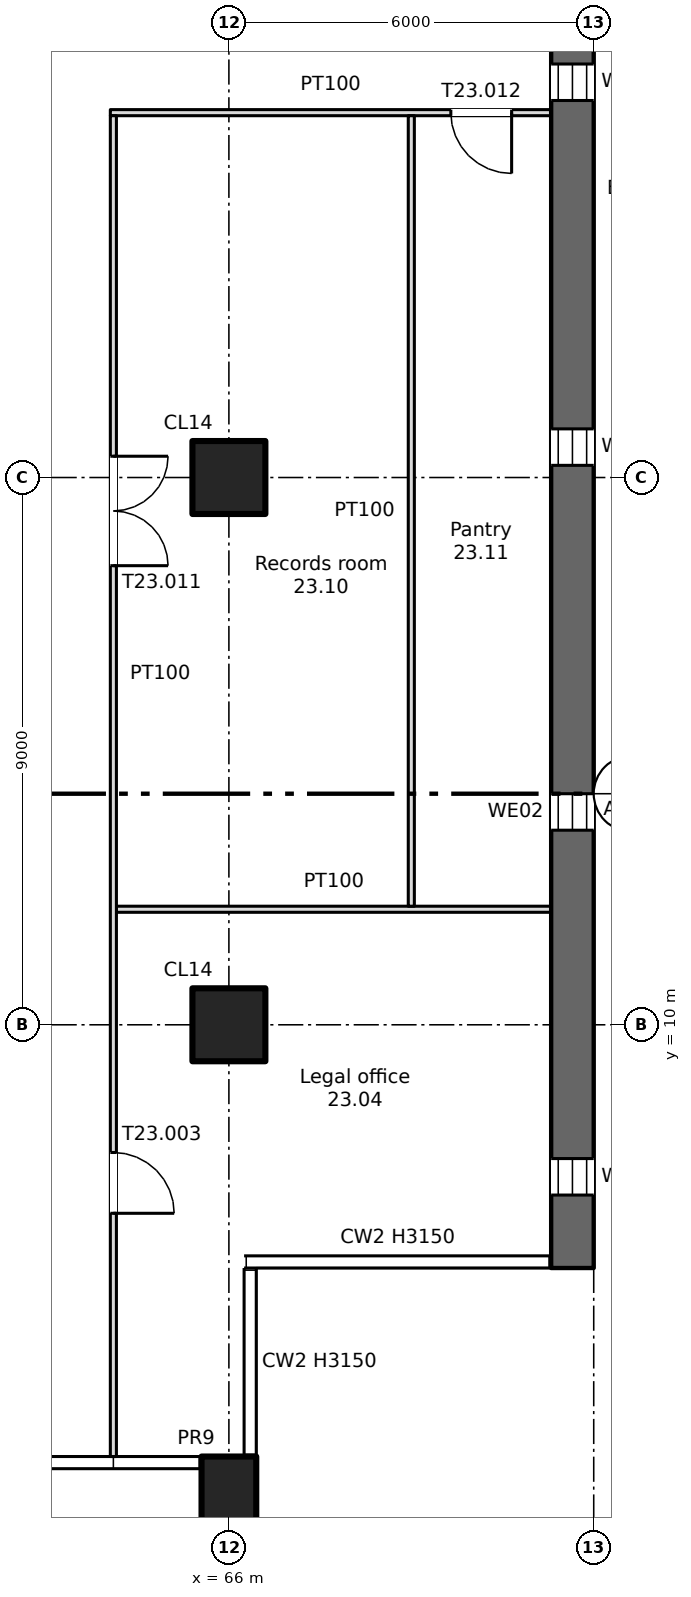
"""IFC4 building model, lengths in metres.
Left out: names, types, materials, properties, quantities, classifications, styles, units other than length and angle.
Written with IfcOpenShell. Run it as: python <this file> out.ifc"""

import sys

from ifc_helpers import new_model, si_unit, direction, frame, frame_2d, origin, origin_2d, place, context, subcontext, project, spatial, rectangle, extrude, element, fill, save


model = new_model("IFC4")
c1 = context("Model", 3, precision=1e-05, world=origin(), true_north=direction((0.0, 1.0)))
c2 = subcontext(c1, "Body", "Model", "MODEL_VIEW")
j1 = project(units=[si_unit("LENGTHUNIT", "METRE"), si_unit("PLANEANGLEUNIT", "RADIAN")], contexts=[c1])
p1 = place(None, origin())
s1 = spatial("IfcSite", under=j1, at=p1, CompositionType="ELEMENT")
p2 = place(p1, origin())
s2 = spatial("IfcBuilding", under=s1, at=p2, CompositionType="ELEMENT")
p3 = place(p2, frame((0.0, 0.0, 155.0)))
s3 = spatial("IfcBuildingStorey", under=s2, at=p3, CompositionType="ELEMENT", Elevation=155.0)
p4 = place(p3, frame((66.0, 2.2, -0.4), z_axis=(0.0, 0.0, 1.0), x_axis=(1.0, 0.0, 0.0)))
e1 = element("IfcColumn", 1, at=p4, inside=s3, PredefinedType="COLUMN", context=c2, shape_type="SweptSolid", body=[
    extrude(rectangle(XDim=0.9, YDim=1.4, at=origin_2d()), origin(), (0.0, 0.0, 1.0), 3.55),
])
for number, where, z_axis, x_axis in (
    (2, (66.0, 10.0, 0.0), (0.0, 0.0, 1.0), (1.0, 0.0, 0.0)),
    (3, (66.0, 19.0, 0.0), (0.0, 0.0, 1.0), (1.0, 0.0, 0.0)),
):
    element("IfcColumn", number, at=place(p3, frame(where, z_axis=z_axis, x_axis=x_axis)), inside=s3, PredefinedType="COLUMN", context=c2, shape_type="SweptSolid", body=[
        extrude(rectangle(XDim=1.2, YDim=1.2, at=origin_2d()), origin(), (0.0, 0.0, 1.0), 3.15),
    ])
p5 = place(p3, frame((71.65, 6.0, 0.0), z_axis=(0.0, 0.0, 1.0), x_axis=(0.0, 1.0, 0.0)))
e4 = element("IfcWall", 4, at=p5, inside=s3, PredefinedType="SHEAR", context=c2, shape_type="SweptSolid", body=[
    extrude(rectangle(XDim=35.5, YDim=0.7, at=frame_2d((17.75, 0.0))), origin(), (0.0, 0.0, 1.0), 3.15),
])
p6 = place(p5, frame((1.2, 0.0, 0.6)))
e5 = element("IfcOpeningElement", 5, at=p6, cuts=e4, PredefinedType="OPENING", context=c2, shape_type="SweptSolid", body=[
    extrude(rectangle(XDim=0.6, YDim=2.4, at=frame_2d((0.3, 1.2))), frame((0.0, 0.36, 0.0), z_axis=(0.0, -1.0, 0.0), x_axis=(1.0, 0.0, 0.0)), (0.0, 0.0, 1.0), 0.72),
])
p7 = place(p5, frame((7.2, 0.0, 0.6)))
e6 = element("IfcOpeningElement", 6, at=p7, cuts=e4, PredefinedType="OPENING", context=c2, shape_type="SweptSolid", body=[
    extrude(rectangle(XDim=0.6, YDim=2.4, at=frame_2d((0.3, 1.2))), frame((0.0, 0.36, 0.0), z_axis=(0.0, -1.0, 0.0), x_axis=(1.0, 0.0, 0.0)), (0.0, 0.0, 1.0), 0.72),
])
p8 = place(p5, frame((13.2, 0.0, 0.6)))
e7 = element("IfcOpeningElement", 7, at=p8, cuts=e4, PredefinedType="OPENING", context=c2, shape_type="SweptSolid", body=[
    extrude(rectangle(XDim=0.6, YDim=2.4, at=frame_2d((0.3, 1.2))), frame((0.0, 0.36, 0.0), z_axis=(0.0, -1.0, 0.0), x_axis=(1.0, 0.0, 0.0)), (0.0, 0.0, 1.0), 0.72),
])
p9 = place(p5, frame((19.2, 0.0, 0.6)))
e8 = element("IfcOpeningElement", 8, at=p9, cuts=e4, PredefinedType="OPENING", context=c2, shape_type="SweptSolid", body=[
    extrude(rectangle(XDim=0.6, YDim=2.4, at=frame_2d((0.3, 1.2))), frame((0.0, 0.36, 0.0), z_axis=(0.0, -1.0, 0.0), x_axis=(1.0, 0.0, 0.0)), (0.0, 0.0, 1.0), 0.72),
])
p10 = place(p5, frame((25.2, 0.0, 0.6)))
e9 = element("IfcOpeningElement", 9, at=p10, cuts=e4, PredefinedType="OPENING", context=c2, shape_type="SweptSolid", body=[
    extrude(rectangle(XDim=0.6, YDim=2.4, at=frame_2d((0.3, 1.2))), frame((0.0, 0.36, 0.0), z_axis=(0.0, -1.0, 0.0), x_axis=(1.0, 0.0, 0.0)), (0.0, 0.0, 1.0), 0.72),
])
p11 = place(p5, frame((31.2, 0.0, 0.6)))
e10 = element("IfcOpeningElement", 10, at=p11, cuts=e4, PredefinedType="OPENING", context=c2, shape_type="SweptSolid", body=[
    extrude(rectangle(XDim=0.6, YDim=2.4, at=frame_2d((0.3, 1.2))), frame((0.0, 0.36, 0.0), z_axis=(0.0, -1.0, 0.0), x_axis=(1.0, 0.0, 0.0)), (0.0, 0.0, 1.0), 0.72),
])
p12 = place(p3, frame((64.15, 11.9, 0.0), z_axis=(0.0, 0.0, 1.0), x_axis=(1.0, 0.0, 0.0)))
e11 = element("IfcWall", 11, at=p12, inside=s3, PredefinedType="PARTITIONING", context=c2, shape_type="SweptSolid", body=[
    extrude(rectangle(XDim=7.15, YDim=0.1, at=frame_2d((3.575, 0.0))), origin(), (0.0, 0.0, 1.0), 3.15),
])
p13 = place(p3, frame((64.05, 25.0, 0.0), z_axis=(0.0, 0.0, 1.0), x_axis=(1.0, 0.0, 0.0)))
e12 = element("IfcWall", 12, at=p13, inside=s3, PredefinedType="PARTITIONING", context=c2, shape_type="SweptSolid", body=[
    extrude(rectangle(XDim=7.25, YDim=0.1, at=frame_2d((3.625, 0.0))), origin(), (0.0, 0.0, 1.0), 3.15),
])
p14 = place(p13, frame((5.6, 0.0, 0.0)))
e13 = element("IfcOpeningElement", 13, at=p14, cuts=e12, PredefinedType="OPENING", context=c2, shape_type="SweptSolid", body=[
    extrude(rectangle(XDim=1.0, YDim=2.1, at=frame_2d((0.5, 1.05))), frame((0.0, 0.06, 0.0), z_axis=(0.0, -1.0, 0.0), x_axis=(1.0, 0.0, 0.0)), (0.0, 0.0, 1.0), 0.12),
])
p15 = place(p3, frame((64.1, 2.9, 0.0), z_axis=(0.0, 0.0, 1.0), x_axis=(0.0, 1.0, 0.0)))
e14 = element("IfcWall", 14, at=p15, inside=s3, PredefinedType="PARTITIONING", context=c2, shape_type="SweptSolid", body=[
    extrude(rectangle(XDim=22.05, YDim=0.1, at=frame_2d((11.025, 0.0))), origin(), (0.0, 0.0, 1.0), 3.15),
])
p16 = place(p15, frame((4.0, 0.0, 0.0)))
e15 = element("IfcOpeningElement", 15, at=p16, cuts=e14, PredefinedType="OPENING", context=c2, shape_type="SweptSolid", body=[
    extrude(rectangle(XDim=1.0, YDim=2.1, at=frame_2d((0.5, 1.05))), frame((0.0, 0.06, 0.0), z_axis=(0.0, -1.0, 0.0), x_axis=(1.0, 0.0, 0.0)), (0.0, 0.0, 1.0), 0.12),
])
p17 = place(p15, frame((14.65, 0.0, 0.0)))
e16 = element("IfcOpeningElement", 16, at=p17, cuts=e14, PredefinedType="OPENING", context=c2, shape_type="SweptSolid", body=[
    extrude(rectangle(XDim=1.8, YDim=2.1, at=frame_2d((0.9, 1.05))), frame((0.0, 0.06, 0.0), z_axis=(0.0, -1.0, 0.0), x_axis=(1.0, 0.0, 0.0)), (0.0, 0.0, 1.0), 0.12),
])
p18 = place(p3, frame((69.0, 11.95, 0.0), z_axis=(0.0, 0.0, 1.0), x_axis=(0.0, 1.0, 0.0)))
e17 = element("IfcWall", 17, at=p18, inside=s3, PredefinedType="PARTITIONING", context=c2, shape_type="SweptSolid", body=[
    extrude(rectangle(XDim=13.0, YDim=0.1, at=frame_2d((6.5, 0.0))), origin(), (0.0, 0.0, 1.0), 3.15),
])
p19 = place(p6, origin())
e18 = element("IfcWindow", 18, at=p19, inside=s3, PartitioningType="SINGLE_PANEL", PredefinedType="WINDOW", context=c2, shape_type="SweptSolid", body=[
    extrude(rectangle(XDim=0.6, YDim=2.4, at=frame_2d((0.3, 1.2))), frame((0.0, 0.03, 0.0), z_axis=(0.0, -1.0, 0.0), x_axis=(1.0, 0.0, 0.0)), (0.0, 0.0, 1.0), 0.06),
])
fill(e5, e18)
p20 = place(p7, origin())
e19 = element("IfcWindow", 19, at=p20, inside=s3, PartitioningType="SINGLE_PANEL", PredefinedType="WINDOW", context=c2, shape_type="SweptSolid", body=[
    extrude(rectangle(XDim=0.6, YDim=2.4, at=frame_2d((0.3, 1.2))), frame((0.0, 0.03, 0.0), z_axis=(0.0, -1.0, 0.0), x_axis=(1.0, 0.0, 0.0)), (0.0, 0.0, 1.0), 0.06),
])
fill(e6, e19)
p21 = place(p8, origin())
e20 = element("IfcWindow", 20, at=p21, inside=s3, PartitioningType="SINGLE_PANEL", PredefinedType="WINDOW", context=c2, shape_type="SweptSolid", body=[
    extrude(rectangle(XDim=0.6, YDim=2.4, at=frame_2d((0.3, 1.2))), frame((0.0, 0.03, 0.0), z_axis=(0.0, -1.0, 0.0), x_axis=(1.0, 0.0, 0.0)), (0.0, 0.0, 1.0), 0.06),
])
fill(e7, e20)
p22 = place(p9, origin())
e21 = element("IfcWindow", 21, at=p22, inside=s3, PartitioningType="SINGLE_PANEL", PredefinedType="WINDOW", context=c2, shape_type="SweptSolid", body=[
    extrude(rectangle(XDim=0.6, YDim=2.4, at=frame_2d((0.3, 1.2))), frame((0.0, 0.03, 0.0), z_axis=(0.0, -1.0, 0.0), x_axis=(1.0, 0.0, 0.0)), (0.0, 0.0, 1.0), 0.06),
])
fill(e8, e21)
p23 = place(p16, origin())
e22 = element("IfcDoor", 22, at=p23, inside=s3, OperationType="SINGLE_SWING_LEFT", PredefinedType="DOOR", context=c2, shape_type="SweptSolid", body=[
    extrude(rectangle(XDim=1.0, YDim=2.1, at=frame_2d((0.5, 1.05))), frame((0.0, 0.025, 0.0), z_axis=(0.0, -1.0, 0.0), x_axis=(1.0, 0.0, 0.0)), (0.0, 0.0, 1.0), 0.05),
])
fill(e15, e22)
p24 = place(p17, origin())
e23 = element("IfcDoor", 23, at=p24, inside=s3, OperationType="DOUBLE_DOOR_SINGLE_SWING", PredefinedType="DOOR", context=c2, shape_type="SweptSolid", body=[
    extrude(rectangle(XDim=1.8, YDim=2.1, at=frame_2d((0.9, 1.05))), frame((0.0, 0.025, 0.0), z_axis=(0.0, -1.0, 0.0), x_axis=(1.0, 0.0, 0.0)), (0.0, 0.0, 1.0), 0.05),
])
fill(e16, e23)
p25 = place(p14, origin())
e24 = element("IfcDoor", 24, at=p25, inside=s3, OperationType="SINGLE_SWING_RIGHT", PredefinedType="DOOR", context=c2, shape_type="SweptSolid", body=[
    extrude(rectangle(XDim=1.0, YDim=2.1, at=frame_2d((0.5, 1.05))), frame((0.0, 0.025, 0.0), z_axis=(0.0, -1.0, 0.0), x_axis=(1.0, 0.0, 0.0)), (0.0, 0.0, 1.0), 0.05),
])
fill(e13, e24)
save(model, sys.argv[1])
